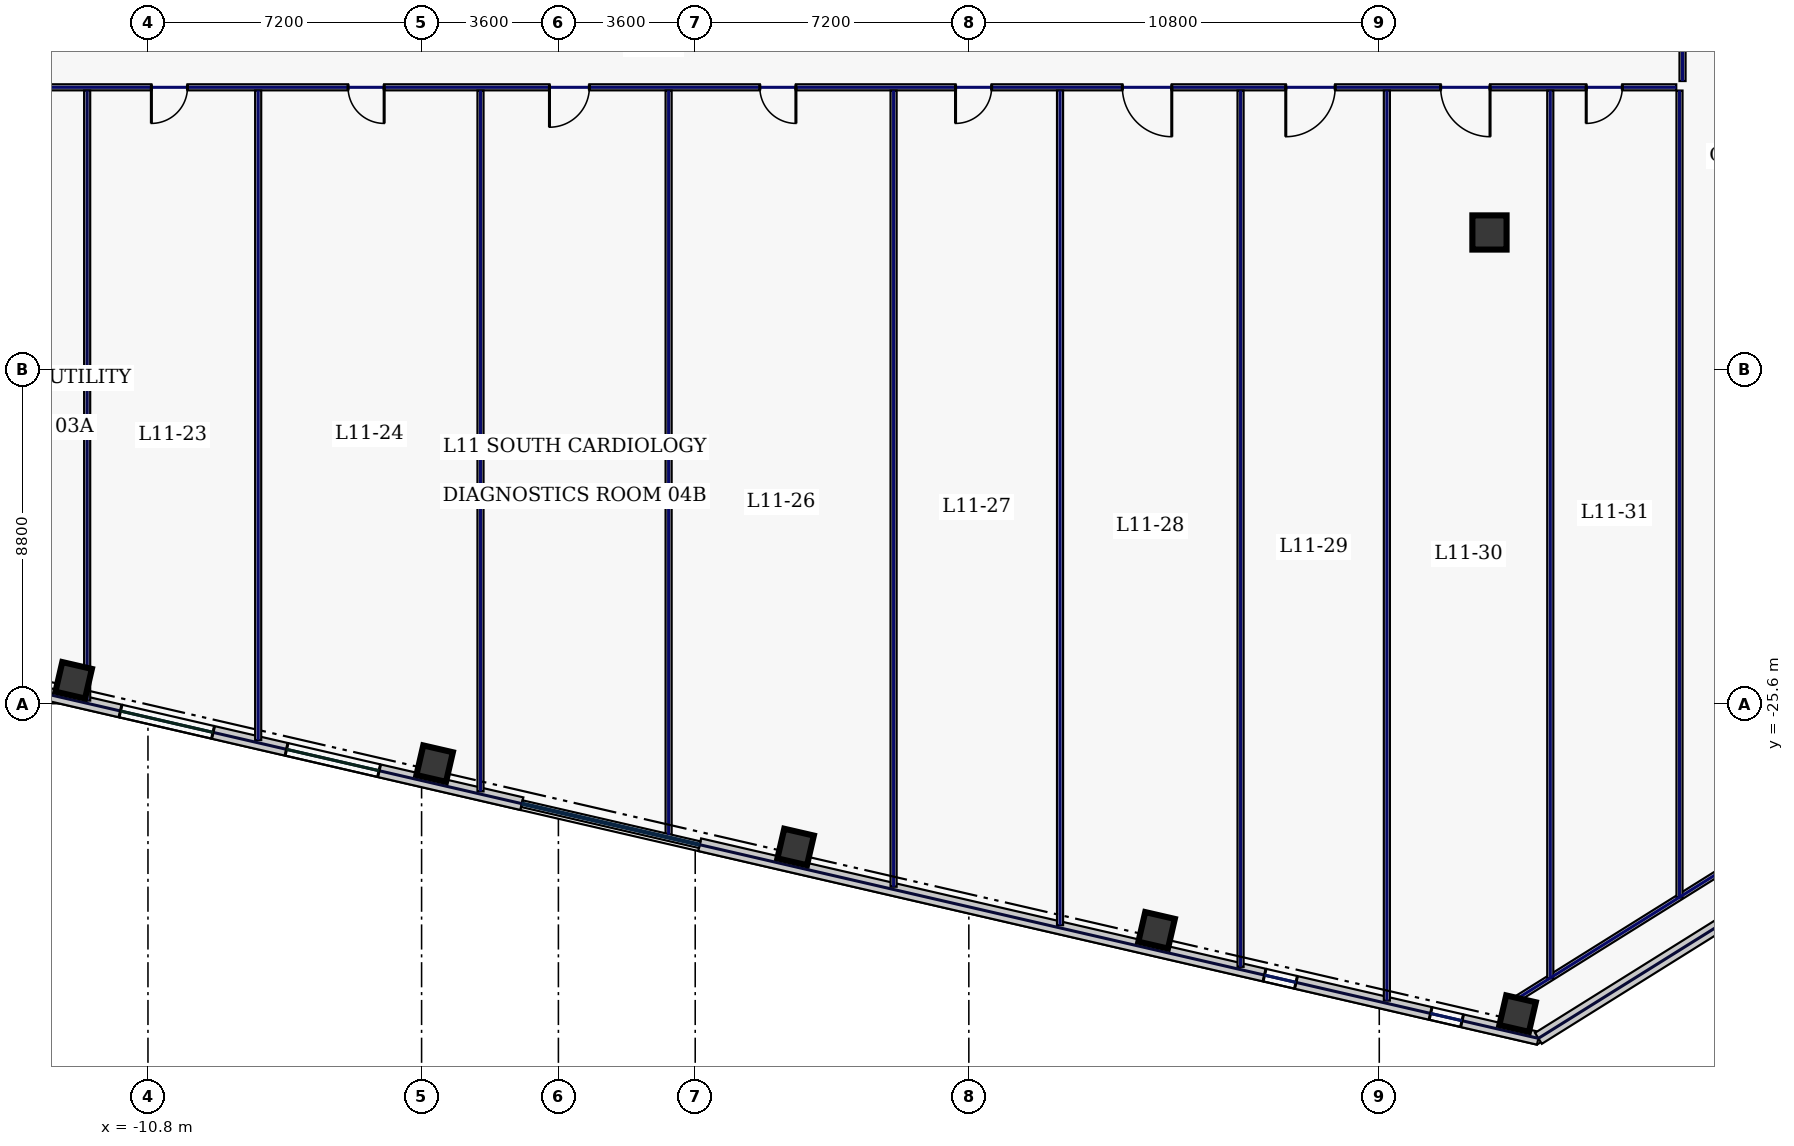
"""IFC4 building model, lengths in metres.
Left out: names, types, materials, properties, quantities, classifications, styles, units other than length and angle.
Written with IfcOpenShell. Run it as: python <this file> out.ifc"""

import sys

from ifc_helpers import new_model, si_unit, direction, frame, frame_2d, origin, origin_2d, place, context, subcontext, project, spatial, rectangle, hollow_rectangle, extrude, element, fill, save


model = new_model("IFC4")
c1 = context("Model", 3, precision=1e-05, world=origin(), true_north=direction((0.0, 1.0)))
c2 = subcontext(c1, "Body", "Model", "MODEL_VIEW")
j1 = project(units=[si_unit("LENGTHUNIT", "METRE"), si_unit("PLANEANGLEUNIT", "RADIAN")], contexts=[c1])
p1 = place(None, origin())
s1 = spatial("IfcSite", under=j1, at=p1, CompositionType="ELEMENT")
p2 = place(p1, origin())
s2 = spatial("IfcBuilding", under=s1, at=p2, CompositionType="ELEMENT")
p3 = place(p2, frame((0.0, 0.0, 55.4)))
s3 = spatial("IfcBuildingStorey", under=s2, at=p3, CompositionType="ELEMENT", Elevation=55.4)
p4 = place(p3, frame((24.5, -13.2, 0.0), z_axis=(0.0, 0.0, 1.0), x_axis=(1.0, 0.0, 0.0)))
e1 = element("IfcColumn", 1, at=p4, inside=s3, PredefinedType="COLUMN", context=c2, shape_type="SweptSolid", body=[
    extrude(hollow_rectangle(XDim=0.9, YDim=0.9, WallThickness=0.04, at=origin_2d()), origin(), (0.0, 0.0, 1.0), 3.74),
])
for number, where, z_axis, x_axis in (
    (2, (-12.755, -24.985, 0.0), (0.0, 0.0, 1.0), (0.974, -0.225, 0.0)),
    (3, (-3.256, -27.178, 0.0), (0.0, 0.0, 1.0), (0.974, -0.225, 0.0)),
    (4, (6.242, -29.371, 0.0), (0.0, 0.0, 1.0), (0.974, -0.225, 0.0)),
    (5, (15.741, -31.564, 0.0), (0.0, 0.0, 1.0), (0.974, -0.225, 0.0)),
    (6, (25.24, -33.757, 0.0), (0.0, 0.0, 1.0), (0.974, -0.225, 0.0)),
):
    element("IfcColumn", number, at=place(p3, frame(where, z_axis=z_axis, x_axis=x_axis)), inside=s3, PredefinedType="COLUMN", context=c2, shape_type="SweptSolid", body=[
        extrude(hollow_rectangle(XDim=0.8, YDim=0.8, WallThickness=0.036, at=origin_2d()), origin(), (0.0, 0.0, 1.0), 3.74),
    ])
p5 = place(p3, frame((-15.281, -24.925, 0.0), z_axis=(0.0, 0.0, 1.0), x_axis=(0.974370193991, -0.22495049469, 0.0)))
e7 = element("IfcWall", 7, at=p5, inside=s3, PredefinedType="STANDARD", context=c2, shape_type="SweptSolid", body=[
    extrude(rectangle(XDim=14.697, YDim=0.34, at=frame_2d((7.349, 0.0))), origin(), (0.0, 0.0, 1.0), 3.74),
])
p6 = place(p5, frame((3.856, 0.0, 0.72)))
e8 = element("IfcOpeningElement", 8, at=p6, cuts=e7, PredefinedType="OPENING", context=c2, shape_type="SweptSolid", body=[
    extrude(rectangle(XDim=2.5, YDim=2.15, at=frame_2d((1.25, 1.075))), frame((0.0, 0.18, 0.0), z_axis=(0.0, -1.0, 0.0), x_axis=(1.0, 0.0, 0.0)), (0.0, 0.0, 1.0), 0.36),
])
p7 = place(p5, frame((8.341, 0.0, 0.72)))
e9 = element("IfcOpeningElement", 9, at=p7, cuts=e7, PredefinedType="OPENING", context=c2, shape_type="SweptSolid", body=[
    extrude(rectangle(XDim=2.5, YDim=2.15, at=frame_2d((1.25, 1.075))), frame((0.0, 0.18, 0.0), z_axis=(0.0, -1.0, 0.0), x_axis=(1.0, 0.0, 0.0)), (0.0, 0.0, 1.0), 0.36),
])
p8 = place(p3, frame((3.717, -29.311, 0.0), z_axis=(0.0, 0.0, 1.0), x_axis=(0.97436993772, -0.224951604723, 0.0)))
e10 = element("IfcWall", 10, at=p8, inside=s3, PredefinedType="STANDARD", context=c2, shape_type="SweptSolid", body=[
    extrude(rectangle(XDim=22.651, YDim=0.34, at=frame_2d((11.326, 0.0))), origin(), (0.0, 0.0, 1.0), 3.74),
])
p9 = place(p8, frame((15.255, 0.0, 0.72)))
e11 = element("IfcOpeningElement", 11, at=p9, cuts=e10, PredefinedType="OPENING", context=c2, shape_type="SweptSolid", body=[
    extrude(rectangle(XDim=0.85, YDim=1.85, at=frame_2d((0.425, 0.925))), frame((0.0, 0.18, 0.0), z_axis=(0.0, -1.0, 0.0), x_axis=(1.0, 0.0, 0.0)), (0.0, 0.0, 1.0), 0.36),
])
p10 = place(p8, frame((19.739, 0.0, 0.72)))
e12 = element("IfcOpeningElement", 12, at=p10, cuts=e10, PredefinedType="OPENING", context=c2, shape_type="SweptSolid", body=[
    extrude(rectangle(XDim=0.85, YDim=1.85, at=frame_2d((0.425, 0.925))), frame((0.0, 0.18, 0.0), z_axis=(0.0, -1.0, 0.0), x_axis=(1.0, 0.0, 0.0)), (0.0, 0.0, 1.0), 0.36),
])
p11 = place(p3, frame((25.788, -34.406, 0.0), z_axis=(0.0, 0.0, 1.0), x_axis=(0.848046504656, 0.529921811158, 0.0)))
e13 = element("IfcWall", 13, at=p11, inside=s3, PredefinedType="STANDARD", context=c2, shape_type="SweptSolid", body=[
    extrude(rectangle(XDim=7.113, YDim=0.34, at=frame_2d((3.557, 0.0))), origin(), (0.0, 0.0, 1.0), 3.74),
])
p12 = place(p3, frame((25.06, -33.468, 0.0), z_axis=(0.0, 0.0, 1.0), x_axis=(0.848043064089, 0.529927317139, 0.0)))
e14 = element("IfcWall", 14, at=p12, inside=s3, PredefinedType="PARTITIONING", context=c2, shape_type="SweptSolid", body=[
    extrude(rectangle(XDim=7.354, YDim=0.16, at=frame_2d((3.677, 0.0))), origin(), (0.0, 0.0, 1.0), 3.74),
])
p13 = place(p3, frame((29.58, 9.415, 0.0), z_axis=(0.0, 0.0, 1.0), x_axis=(0.0, -1.0, 0.0)))
e15 = element("IfcWall", 15, at=p13, inside=s3, PredefinedType="PARTITIONING", context=c2, shape_type="SweptSolid", body=[
    extrude(rectangle(XDim=18.63, YDim=0.16, at=frame_2d((9.315, 0.0))), origin(), (0.0, 0.0, 1.0), 3.74),
])
p14 = place(p13, frame((16.081, 0.0, 0.0)))
e16 = element("IfcOpeningElement", 16, at=p14, cuts=e15, PredefinedType="OPENING", context=c2, shape_type="SweptSolid", body=[
    extrude(rectangle(XDim=0.95, YDim=2.2, at=frame_2d((0.475, 1.1))), frame((0.0, 0.09, 0.0), z_axis=(0.0, -1.0, 0.0), x_axis=(1.0, 0.0, 0.0)), (0.0, 0.0, 1.0), 0.18),
])
p15 = place(p13, frame((12.25, 0.0, 0.0)))
e17 = element("IfcOpeningElement", 17, at=p15, cuts=e15, PredefinedType="OPENING", context=c2, shape_type="SweptSolid", body=[
    extrude(rectangle(XDim=0.95, YDim=2.2, at=frame_2d((0.475, 1.1))), frame((0.0, 0.09, 0.0), z_axis=(0.0, -1.0, 0.0), x_axis=(1.0, 0.0, 0.0)), (0.0, 0.0, 1.0), 0.18),
])
p16 = place(p13, frame((7.05, 0.0, 0.0)))
e18 = element("IfcOpeningElement", 18, at=p16, cuts=e15, PredefinedType="OPENING", context=c2, shape_type="SweptSolid", body=[
    extrude(rectangle(XDim=0.95, YDim=2.2, at=frame_2d((0.475, 1.1))), frame((0.0, 0.09, 0.0), z_axis=(0.0, -1.0, 0.0), x_axis=(1.0, 0.0, 0.0)), (0.0, 0.0, 1.0), 0.18),
])
p17 = place(p13, frame((1.869, 0.0, 0.0)))
e19 = element("IfcOpeningElement", 19, at=p17, cuts=e15, PredefinedType="OPENING", context=c2, shape_type="SweptSolid", body=[
    extrude(rectangle(XDim=0.95, YDim=2.2, at=frame_2d((0.475, 1.1))), frame((0.0, 0.09, 0.0), z_axis=(0.0, -1.0, 0.0), x_axis=(1.0, 0.0, 0.0)), (0.0, 0.0, 1.0), 0.18),
])
p18 = place(p3, frame((29.415, -9.38, 0.0), z_axis=(0.0, 0.0, 1.0), x_axis=(-1.0, 0.0, 0.0)))
e20 = element("IfcWall", 20, at=p18, inside=s3, PredefinedType="PARTITIONING", context=c2, shape_type="SweptSolid", body=[
    extrude(rectangle(XDim=58.83, YDim=0.16, at=frame_2d((29.415, 0.0))), origin(), (0.0, 0.0, 1.0), 3.74),
])
p19 = place(p18, frame((55.831, 0.0, 0.0)))
e21 = element("IfcOpeningElement", 21, at=p19, cuts=e20, PredefinedType="OPENING", context=c2, shape_type="SweptSolid", body=[
    extrude(rectangle(XDim=1.45, YDim=2.2, at=frame_2d((0.725, 1.1))), frame((0.0, 0.09, 0.0), z_axis=(0.0, -1.0, 0.0), x_axis=(1.0, 0.0, 0.0)), (0.0, 0.0, 1.0), 0.18),
])
p20 = place(p18, frame((50.175, 0.0, 0.0)))
e22 = element("IfcOpeningElement", 22, at=p20, cuts=e20, PredefinedType="OPENING", context=c2, shape_type="SweptSolid", body=[
    extrude(rectangle(XDim=1.3, YDim=2.2, at=frame_2d((0.65, 1.1))), frame((0.0, 0.09, 0.0), z_axis=(0.0, -1.0, 0.0), x_axis=(1.0, 0.0, 0.0)), (0.0, 0.0, 1.0), 0.18),
])
p21 = place(p18, frame((44.125, 0.0, 0.0)))
e23 = element("IfcOpeningElement", 23, at=p21, cuts=e20, PredefinedType="OPENING", context=c2, shape_type="SweptSolid", body=[
    extrude(rectangle(XDim=0.95, YDim=2.2, at=frame_2d((0.475, 1.1))), frame((0.0, 0.09, 0.0), z_axis=(0.0, -1.0, 0.0), x_axis=(1.0, 0.0, 0.0)), (0.0, 0.0, 1.0), 0.18),
])
p22 = place(p18, frame((39.175, 0.0, 0.0)))
e24 = element("IfcOpeningElement", 24, at=p22, cuts=e20, PredefinedType="OPENING", context=c2, shape_type="SweptSolid", body=[
    extrude(rectangle(XDim=0.95, YDim=2.2, at=frame_2d((0.475, 1.1))), frame((0.0, 0.09, 0.0), z_axis=(0.0, -1.0, 0.0), x_axis=(1.0, 0.0, 0.0)), (0.0, 0.0, 1.0), 0.18),
])
p23 = place(p18, frame((34.0, 0.0, 0.0)))
e25 = element("IfcOpeningElement", 25, at=p23, cuts=e20, PredefinedType="OPENING", context=c2, shape_type="SweptSolid", body=[
    extrude(rectangle(XDim=0.95, YDim=2.2, at=frame_2d((0.475, 1.1))), frame((0.0, 0.09, 0.0), z_axis=(0.0, -1.0, 0.0), x_axis=(1.0, 0.0, 0.0)), (0.0, 0.0, 1.0), 0.18),
])
p24 = place(p18, frame((28.6, 0.0, 0.0)))
e26 = element("IfcOpeningElement", 26, at=p24, cuts=e20, PredefinedType="OPENING", context=c2, shape_type="SweptSolid", body=[
    extrude(rectangle(XDim=1.05, YDim=2.2, at=frame_2d((0.525, 1.1))), frame((0.0, 0.09, 0.0), z_axis=(0.0, -1.0, 0.0), x_axis=(1.0, 0.0, 0.0)), (0.0, 0.0, 1.0), 0.18),
])
p25 = place(p18, frame((23.165, 0.0, 0.0)))
e27 = element("IfcOpeningElement", 27, at=p25, cuts=e20, PredefinedType="OPENING", context=c2, shape_type="SweptSolid", body=[
    extrude(rectangle(XDim=0.95, YDim=2.2, at=frame_2d((0.475, 1.1))), frame((0.0, 0.09, 0.0), z_axis=(0.0, -1.0, 0.0), x_axis=(1.0, 0.0, 0.0)), (0.0, 0.0, 1.0), 0.18),
])
p26 = place(p18, frame((18.015, 0.0, 0.0)))
e28 = element("IfcOpeningElement", 28, at=p26, cuts=e20, PredefinedType="OPENING", context=c2, shape_type="SweptSolid", body=[
    extrude(rectangle(XDim=0.95, YDim=2.2, at=frame_2d((0.475, 1.1))), frame((0.0, 0.09, 0.0), z_axis=(0.0, -1.0, 0.0), x_axis=(1.0, 0.0, 0.0)), (0.0, 0.0, 1.0), 0.18),
])
p27 = place(p18, frame((13.275, 0.0, 0.0)))
e29 = element("IfcOpeningElement", 29, at=p27, cuts=e20, PredefinedType="OPENING", context=c2, shape_type="SweptSolid", body=[
    extrude(rectangle(XDim=1.3, YDim=2.2, at=frame_2d((0.65, 1.1))), frame((0.0, 0.09, 0.0), z_axis=(0.0, -1.0, 0.0), x_axis=(1.0, 0.0, 0.0)), (0.0, 0.0, 1.0), 0.18),
])
p28 = place(p18, frame((8.975, 0.0, 0.0)))
e30 = element("IfcOpeningElement", 30, at=p28, cuts=e20, PredefinedType="OPENING", context=c2, shape_type="SweptSolid", body=[
    extrude(rectangle(XDim=1.3, YDim=2.2, at=frame_2d((0.65, 1.1))), frame((0.0, 0.09, 0.0), z_axis=(0.0, -1.0, 0.0), x_axis=(1.0, 0.0, 0.0)), (0.0, 0.0, 1.0), 0.18),
])
p29 = place(p18, frame((4.9, 0.0, 0.0)))
e31 = element("IfcOpeningElement", 31, at=p29, cuts=e20, PredefinedType="OPENING", context=c2, shape_type="SweptSolid", body=[
    extrude(rectangle(XDim=1.3, YDim=2.2, at=frame_2d((0.65, 1.1))), frame((0.0, 0.09, 0.0), z_axis=(0.0, -1.0, 0.0), x_axis=(1.0, 0.0, 0.0)), (0.0, 0.0, 1.0), 0.18),
])
p30 = place(p18, frame((1.419, 0.0, 0.0)))
e32 = element("IfcOpeningElement", 32, at=p30, cuts=e20, PredefinedType="OPENING", context=c2, shape_type="SweptSolid", body=[
    extrude(rectangle(XDim=0.95, YDim=2.2, at=frame_2d((0.475, 1.1))), frame((0.0, 0.09, 0.0), z_axis=(0.0, -1.0, 0.0), x_axis=(1.0, 0.0, 0.0)), (0.0, 0.0, 1.0), 0.18),
])
p31 = place(p3, frame((29.5, -30.703, 0.0), z_axis=(0.0, 0.0, 1.0), x_axis=(0.0, 1.0, 0.0)))
e33 = element("IfcWall", 33, at=p31, inside=s3, PredefinedType="PARTITIONING", context=c2, shape_type="SweptSolid", body=[
    extrude(rectangle(XDim=21.238, YDim=0.16, at=frame_2d((10.619, 0.0))), origin(), (0.0, 0.0, 1.0), 3.74),
])
p32 = place(p3, frame((-7.9, -26.557, 0.0), z_axis=(0.0, 0.0, 1.0), x_axis=(0.0, 1.0, 0.0)))
e34 = element("IfcWall", 34, at=p32, inside=s3, PredefinedType="PARTITIONING", context=c2, shape_type="SweptSolid", body=[
    extrude(rectangle(XDim=17.092, YDim=0.16, at=frame_2d((8.546, 0.0))), origin(), (0.0, 0.0, 1.0), 3.74),
])
p33 = place(p3, frame((2.9, -29.051, 0.0), z_axis=(0.0, 0.0, 1.0), x_axis=(0.0, 1.0, 0.0)))
e35 = element("IfcWall", 35, at=p33, inside=s3, PredefinedType="PARTITIONING", context=c2, shape_type="SweptSolid", body=[
    extrude(rectangle(XDim=19.586, YDim=0.16, at=frame_2d((9.793, 0.0))), origin(), (0.0, 0.0, 1.0), 3.74),
])
p34 = place(p3, frame((13.2, -31.429, 0.0), z_axis=(0.0, 0.0, 1.0), x_axis=(0.0, 1.0, 0.0)))
e36 = element("IfcWall", 36, at=p34, inside=s3, PredefinedType="PARTITIONING", context=c2, shape_type="SweptSolid", body=[
    extrude(rectangle(XDim=21.964, YDim=0.16, at=frame_2d((10.982, 0.0))), origin(), (0.0, 0.0, 1.0), 3.74),
])
p35 = place(p3, frame((21.8, -33.414, 0.0), z_axis=(0.0, 0.0, 1.0), x_axis=(0.0, 1.0, 0.0)))
e37 = element("IfcWall", 37, at=p35, inside=s3, PredefinedType="PARTITIONING", context=c2, shape_type="SweptSolid", body=[
    extrude(rectangle(XDim=23.949, YDim=0.16, at=frame_2d((11.975, 0.0))), origin(), (0.0, 0.0, 1.0), 3.74),
])
p36 = place(p3, frame((-12.4, -25.518, 0.0), z_axis=(0.0, 0.0, 1.0), x_axis=(0.0, 1.0, 0.0)))
e38 = element("IfcWall", 38, at=p36, inside=s3, PredefinedType="PARTITIONING", context=c2, shape_type="SweptSolid", body=[
    extrude(rectangle(XDim=16.053, YDim=0.16, at=frame_2d((8.027, 0.0))), origin(), (0.0, 0.0, 1.0), 3.165),
])
p37 = place(p3, frame((-2.05, -27.908, 0.0), z_axis=(0.0, 0.0, 1.0), x_axis=(0.0, 1.0, 0.0)))
e39 = element("IfcWall", 39, at=p37, inside=s3, PredefinedType="PARTITIONING", context=c2, shape_type="SweptSolid", body=[
    extrude(rectangle(XDim=18.443, YDim=0.16, at=frame_2d((9.221, 0.0))), origin(), (0.0, 0.0, 1.0), 3.74),
])
p38 = place(p3, frame((8.82, -30.417, 0.0), z_axis=(0.0, 0.0, 1.0), x_axis=(0.0, 1.0, 0.0)))
e40 = element("IfcWall", 40, at=p38, inside=s3, PredefinedType="PARTITIONING", context=c2, shape_type="SweptSolid", body=[
    extrude(rectangle(XDim=20.952, YDim=0.16, at=frame_2d((10.476, 0.0))), origin(), (0.0, 0.0, 1.0), 3.74),
])
p39 = place(p3, frame((17.95, -32.525, 0.0), z_axis=(0.0, 0.0, 1.0), x_axis=(0.0, 1.0, 0.0)))
e41 = element("IfcWall", 41, at=p39, inside=s3, PredefinedType="PARTITIONING", context=c2, shape_type="SweptSolid", body=[
    extrude(rectangle(XDim=23.06, YDim=0.16, at=frame_2d((11.53, 0.0))), origin(), (0.0, 0.0, 1.0), 3.74),
])
p40 = place(p3, frame((26.1, -32.827, 0.0), z_axis=(0.0, 0.0, 1.0), x_axis=(0.0, 1.0, 0.0)))
e42 = element("IfcWall", 42, at=p40, inside=s3, PredefinedType="PARTITIONING", context=c2, shape_type="SweptSolid", body=[
    extrude(rectangle(XDim=23.362, YDim=0.16, at=frame_2d((11.681, 0.0))), origin(), (0.0, 0.0, 1.0), 3.74),
])
p41 = place(p6, origin())
e43 = element("IfcWindow", 43, at=p41, inside=s3, PartitioningType="SINGLE_PANEL", PredefinedType="WINDOW", context=c2, shape_type="SweptSolid", body=[
    extrude(rectangle(XDim=2.5, YDim=2.15, at=frame_2d((1.25, 1.075))), frame((0.0, 0.03, 0.0), z_axis=(0.0, -1.0, 0.0), x_axis=(1.0, 0.0, 0.0)), (0.0, 0.0, 1.0), 0.06),
])
fill(e8, e43)
p42 = place(p7, origin())
e44 = element("IfcWindow", 44, at=p42, inside=s3, PartitioningType="SINGLE_PANEL", PredefinedType="WINDOW", context=c2, shape_type="SweptSolid", body=[
    extrude(rectangle(XDim=2.5, YDim=2.15, at=frame_2d((1.25, 1.075))), frame((0.0, 0.03, 0.0), z_axis=(0.0, -1.0, 0.0), x_axis=(1.0, 0.0, 0.0)), (0.0, 0.0, 1.0), 0.06),
])
fill(e9, e44)
p43 = place(p9, origin())
e45 = element("IfcWindow", 45, at=p43, inside=s3, PartitioningType="SINGLE_PANEL", PredefinedType="WINDOW", context=c2, shape_type="SweptSolid", body=[
    extrude(rectangle(XDim=0.85, YDim=1.85, at=frame_2d((0.425, 0.925))), frame((0.0, 0.03, 0.0), z_axis=(0.0, -1.0, 0.0), x_axis=(1.0, 0.0, 0.0)), (0.0, 0.0, 1.0), 0.06),
])
fill(e11, e45)
p44 = place(p10, origin())
e46 = element("IfcWindow", 46, at=p44, inside=s3, PartitioningType="SINGLE_PANEL", PredefinedType="WINDOW", context=c2, shape_type="SweptSolid", body=[
    extrude(rectangle(XDim=0.85, YDim=1.85, at=frame_2d((0.425, 0.925))), frame((0.0, 0.03, 0.0), z_axis=(0.0, -1.0, 0.0), x_axis=(1.0, 0.0, 0.0)), (0.0, 0.0, 1.0), 0.06),
])
fill(e12, e46)
p45 = place(p22, origin())
e47 = element("IfcDoor", 47, at=p45, inside=s3, OperationType="SINGLE_SWING_RIGHT", PredefinedType="DOOR", context=c2, shape_type="SweptSolid", body=[
    extrude(rectangle(XDim=0.95, YDim=2.2, at=frame_2d((0.475, 1.1))), frame((0.0, 0.025, 0.0), z_axis=(0.0, -1.0, 0.0), x_axis=(1.0, 0.0, 0.0)), (0.0, 0.0, 1.0), 0.05),
])
fill(e24, e47)
p46 = place(p23, origin())
e48 = element("IfcDoor", 48, at=p46, inside=s3, OperationType="SINGLE_SWING_LEFT", PredefinedType="DOOR", context=c2, shape_type="SweptSolid", body=[
    extrude(rectangle(XDim=0.95, YDim=2.2, at=frame_2d((0.475, 1.1))), frame((0.0, 0.025, 0.0), z_axis=(0.0, -1.0, 0.0), x_axis=(1.0, 0.0, 0.0)), (0.0, 0.0, 1.0), 0.05),
])
fill(e25, e48)
p47 = place(p24, origin())
e49 = element("IfcDoor", 49, at=p47, inside=s3, OperationType="SINGLE_SWING_RIGHT", PredefinedType="DOOR", context=c2, shape_type="SweptSolid", body=[
    extrude(rectangle(XDim=1.05, YDim=2.2, at=frame_2d((0.525, 1.1))), frame((0.0, 0.025, 0.0), z_axis=(0.0, -1.0, 0.0), x_axis=(1.0, 0.0, 0.0)), (0.0, 0.0, 1.0), 0.05),
])
fill(e26, e49)
p48 = place(p25, origin())
e50 = element("IfcDoor", 50, at=p48, inside=s3, OperationType="SINGLE_SWING_LEFT", PredefinedType="DOOR", context=c2, shape_type="SweptSolid", body=[
    extrude(rectangle(XDim=0.95, YDim=2.2, at=frame_2d((0.475, 1.1))), frame((0.0, 0.025, 0.0), z_axis=(0.0, -1.0, 0.0), x_axis=(1.0, 0.0, 0.0)), (0.0, 0.0, 1.0), 0.05),
])
fill(e27, e50)
p49 = place(p26, origin())
e51 = element("IfcDoor", 51, at=p49, inside=s3, OperationType="SINGLE_SWING_RIGHT", PredefinedType="DOOR", context=c2, shape_type="SweptSolid", body=[
    extrude(rectangle(XDim=0.95, YDim=2.2, at=frame_2d((0.475, 1.1))), frame((0.0, 0.025, 0.0), z_axis=(0.0, -1.0, 0.0), x_axis=(1.0, 0.0, 0.0)), (0.0, 0.0, 1.0), 0.05),
])
fill(e28, e51)
p50 = place(p27, origin())
e52 = element("IfcDoor", 52, at=p50, inside=s3, OperationType="SINGLE_SWING_LEFT", PredefinedType="DOOR", context=c2, shape_type="SweptSolid", body=[
    extrude(rectangle(XDim=1.3, YDim=2.2, at=frame_2d((0.65, 1.1))), frame((0.0, 0.025, 0.0), z_axis=(0.0, -1.0, 0.0), x_axis=(1.0, 0.0, 0.0)), (0.0, 0.0, 1.0), 0.05),
])
fill(e29, e52)
p51 = place(p28, origin())
e53 = element("IfcDoor", 53, at=p51, inside=s3, OperationType="SINGLE_SWING_RIGHT", PredefinedType="DOOR", context=c2, shape_type="SweptSolid", body=[
    extrude(rectangle(XDim=1.3, YDim=2.2, at=frame_2d((0.65, 1.1))), frame((0.0, 0.025, 0.0), z_axis=(0.0, -1.0, 0.0), x_axis=(1.0, 0.0, 0.0)), (0.0, 0.0, 1.0), 0.05),
])
fill(e30, e53)
p52 = place(p29, origin())
e54 = element("IfcDoor", 54, at=p52, inside=s3, OperationType="SINGLE_SWING_LEFT", PredefinedType="DOOR", context=c2, shape_type="SweptSolid", body=[
    extrude(rectangle(XDim=1.3, YDim=2.2, at=frame_2d((0.65, 1.1))), frame((0.0, 0.025, 0.0), z_axis=(0.0, -1.0, 0.0), x_axis=(1.0, 0.0, 0.0)), (0.0, 0.0, 1.0), 0.05),
])
fill(e31, e54)
p53 = place(p30, origin())
e55 = element("IfcDoor", 55, at=p53, inside=s3, OperationType="SINGLE_SWING_RIGHT", PredefinedType="DOOR", context=c2, shape_type="SweptSolid", body=[
    extrude(rectangle(XDim=0.95, YDim=2.2, at=frame_2d((0.475, 1.1))), frame((0.0, 0.025, 0.0), z_axis=(0.0, -1.0, 0.0), x_axis=(1.0, 0.0, 0.0)), (0.0, 0.0, 1.0), 0.05),
])
fill(e32, e55)
save(model, sys.argv[1])
